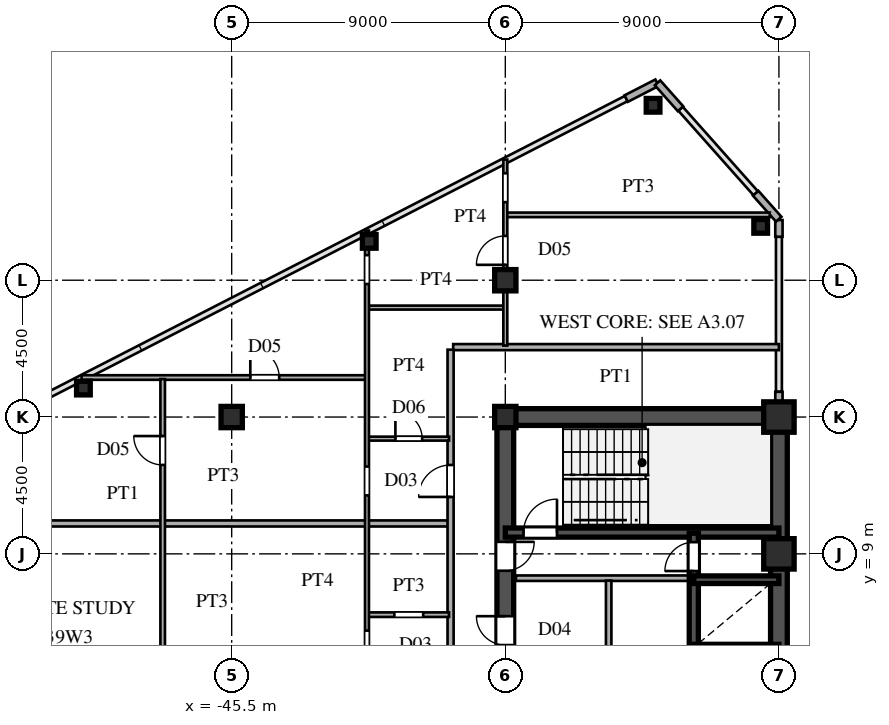
"""IFC4 building model, lengths in metres.
Left out: names, types, materials, properties, quantities, classifications, styles, units other than length and angle.
Written with IfcOpenShell. Run it as: python <this file> out.ifc"""

import sys

from ifc_helpers import new_model, si_unit, direction, frame, frame_2d, origin, origin_2d, place, context, subcontext, project, spatial, rectangle, hollow_rectangle, i_section, extrude, source, transform, mapped, element, fill, save


model = new_model("IFC4")
c1 = context("Model", 3, precision=1e-05, world=origin(), true_north=direction((0.0, 1.0)))
c2 = subcontext(c1, "Body", "Model", "MODEL_VIEW")
j1 = project(units=[si_unit("LENGTHUNIT", "METRE"), si_unit("PLANEANGLEUNIT", "RADIAN")], contexts=[c1])
p1 = place(None, origin())
s1 = spatial("IfcSite", under=j1, at=p1, CompositionType="ELEMENT")
p2 = place(p1, origin())
s2 = spatial("IfcBuilding", under=s1, at=p2, CompositionType="ELEMENT")
p3 = place(p2, frame((0.0, 0.0, 147.6)))
s3 = spatial("IfcBuildingStorey", under=s2, at=p3, CompositionType="ELEMENT", Elevation=147.6)
m1 = source(origin(), c2, "Body", "SweptSolid", [
    extrude(hollow_rectangle(XDim=1.0, YDim=1.0, WallThickness=0.042, at=origin_2d()), origin(), (0.0, 0.0, 1.0), 3.6),
])
for number, where, z_axis, x_axis in (
    (1, (-27.5, 9.0, 0.0), (0.0, 0.0, 1.0), (1.0, 0.0, 0.0)),
    (2, (-27.5, 13.5, 0.0), (0.0, 0.0, 1.0), (1.0, 0.0, 0.0)),
):
    element("IfcColumn", number, at=place(p3, frame(where, z_axis=z_axis, x_axis=x_axis)), inside=s3, PredefinedType="COLUMN", context=c2, shape_type="MappedRepresentation", body=[
        mapped(m1, transform((0.0, 0.0, 0.0), scale=1.0)),
    ])
m2 = source(origin(), c2, "Body", "SweptSolid", [
    extrude(i_section(OverallWidth=0.7, OverallDepth=0.7, WebThickness=0.028, FlangeThickness=0.045, at=origin_2d()), origin(), (0.0, 0.0, 1.0), 3.6),
])
for number, where, z_axis, x_axis in (
    (3, (-36.5, 13.5, 0.0), (0.0, 0.0, 1.0), (1.0, 0.0, 0.0)),
    (4, (-36.5, 18.0, 0.0), (0.0, 0.0, 1.0), (1.0, 0.0, 0.0)),
    (5, (-45.5, 13.5, 0.0), (0.0, 0.0, 1.0), (1.0, 0.0, 0.0)),
):
    element("IfcColumn", number, at=place(p3, frame(where, z_axis=z_axis, x_axis=x_axis)), inside=s3, PredefinedType="COLUMN", context=c2, shape_type="MappedRepresentation", body=[
        mapped(m2, transform((0.0, 0.0, 0.0), scale=1.0)),
    ])
m3 = source(origin(), c2, "Body", "SweptSolid", [
    extrude(hollow_rectangle(XDim=0.45, YDim=0.45, WallThickness=0.018, at=origin_2d()), origin(), (0.0, 0.0, 1.0), 3.6),
])
for number, where, z_axis, x_axis in (
    (6, (-28.1, 19.772, 0.0), (0.0, 0.0, 1.0), (1.0, 0.0, 0.0)),
    (7, (-31.64, 23.754, 0.0), (0.0, 0.0, 1.0), (1.0, 0.0, 0.0)),
    (8, (-40.976, 19.278, 0.0), (0.0, 0.0, 1.0), (1.0, 0.0, 0.0)),
    (9, (-50.377, 14.453, 0.0), (0.0, 0.0, 1.0), (1.0, 0.0, 0.0)),
):
    element("IfcColumn", number, at=place(p3, frame(where, z_axis=z_axis, x_axis=x_axis)), inside=s3, PredefinedType="COLUMN", context=c2, shape_type="MappedRepresentation", body=[
        mapped(m3, transform((0.0, 0.0, 0.0), scale=1.0)),
    ])
p4 = place(p3, frame((-27.5, 13.78, 0.0), z_axis=(0.0, 0.0, 1.0), x_axis=(0.0, 1.0, 0.0)))
e10 = element("IfcWall", 10, at=p4, inside=s3, PredefinedType="SOLIDWALL", context=c2, shape_type="SweptSolid", body=[
    extrude(rectangle(XDim=0.55, YDim=0.24, at=frame_2d((0.275, 0.0))), origin(), (0.0, 0.0, 1.0), 2.88),
])
p5 = place(p3, frame((-27.5, 19.43, 0.0), z_axis=(0.0, 0.0, 1.0), x_axis=(0.0, 1.0, 0.0)))
e11 = element("IfcWall", 11, at=p5, inside=s3, PredefinedType="SOLIDWALL", context=c2, shape_type="SweptSolid", body=[
    extrude(rectangle(XDim=0.55, YDim=0.24, at=frame_2d((0.275, 0.0))), origin(), (0.0, 0.0, 1.0), 3.38),
])
for number, where, z_axis, x_axis in (
    (12, (-27.507, 20.008, 0.0), (0.0, 0.0, 1.0), (-0.664, 0.747, 0.0)),
    (13, (-30.736, 23.64, 0.0), (0.0, 0.0, 1.0), (-0.664, 0.747, 0.0)),
):
    element("IfcWall", number, at=place(p3, frame(where, z_axis=z_axis, x_axis=x_axis)), inside=s3, PredefinedType="SOLIDWALL", context=c2, shape_type="SweptSolid", body=[
        extrude(rectangle(XDim=1.14, YDim=0.24, at=frame_2d((0.57, 0.0))), origin(), (0.0, 0.0, 1.0), 3.38),
    ])
p6 = place(p3, frame((-31.509, 24.495, 0.0), z_axis=(0.0, 0.0, 1.0), x_axis=(-0.889797395748, -0.456355776255, 0.0)))
e14 = element("IfcWall", 14, at=p6, inside=s3, PredefinedType="SOLIDWALL", context=c2, shape_type="SweptSolid", body=[
    extrude(rectangle(XDim=1.14, YDim=0.24, at=frame_2d((0.57, 0.0))), origin(), (0.0, 0.0, 1.0), 3.38),
])
p7 = place(p3, frame((-27.5, 1.3, 0.0), z_axis=(0.0, 0.0, 1.0), x_axis=(0.0, 1.0, 0.0)))
e15 = element("IfcWall", 15, at=p7, inside=s3, PredefinedType="SHEAR", context=c2, shape_type="SweptSolid", body=[
    extrude(rectangle(XDim=12.2, YDim=0.55, at=frame_2d((6.1, 0.0))), origin(), (0.0, 0.0, 1.0), 3.38),
])
p8 = place(p3, frame((-36.5, 13.5, 0.0), z_axis=(0.0, 0.0, 1.0), x_axis=(1.0, 0.0, 0.0)))
e16 = element("IfcWall", 16, at=p8, inside=s3, PredefinedType="SHEAR", context=c2, shape_type="SweptSolid", body=[
    extrude(rectangle(XDim=9.0, YDim=0.55, at=frame_2d((4.5, 0.0))), origin(), (0.0, 0.0, 1.0), 3.38),
])
p9 = place(p3, frame((-36.5, 8.2, 0.0), z_axis=(0.0, 0.0, 1.0), x_axis=(0.0, 1.0, 0.0)))
e17 = element("IfcWall", 17, at=p9, inside=s3, PredefinedType="SHEAR", context=c2, shape_type="SweptSolid", body=[
    extrude(rectangle(XDim=5.45, YDim=0.55, at=frame_2d((2.725, 0.0))), origin(), (0.0, 0.0, 1.0), 3.38),
])
p10 = place(p9, frame((0.245, 0.0, 0.0)))
e18 = element("IfcOpeningElement", 18, at=p10, cuts=e17, PredefinedType="OPENING", context=c2, shape_type="SweptSolid", body=[
    extrude(rectangle(XDim=0.95, YDim=2.15, at=frame_2d((0.475, 1.075))), frame((0.0, 0.285, 0.0), z_axis=(0.0, -1.0, 0.0), x_axis=(1.0, 0.0, 0.0)), (0.0, 0.0, 1.0), 0.57),
])
p11 = place(p3, frame((-36.5, 4.75, 0.0), z_axis=(0.0, 0.0, 1.0), x_axis=(0.0, 1.0, 0.0)))
e19 = element("IfcWall", 19, at=p11, inside=s3, PredefinedType="SHEAR", context=c2, shape_type="SweptSolid", body=[
    extrude(rectangle(XDim=3.45, YDim=0.55, at=frame_2d((1.725, 0.0))), origin(), (0.0, 0.0, 1.0), 3.38),
])
p12 = place(p11, frame((1.25, 0.0, 0.0)))
e20 = element("IfcOpeningElement", 20, at=p12, cuts=e19, PredefinedType="OPENING", context=c2, shape_type="SweptSolid", body=[
    extrude(rectangle(XDim=0.95, YDim=2.15, at=frame_2d((0.475, 1.075))), frame((0.0, 0.285, 0.0), z_axis=(0.0, -1.0, 0.0), x_axis=(1.0, 0.0, 0.0)), (0.0, 0.0, 1.0), 0.57),
])
p13 = place(p3, frame((-36.5, 9.7, 0.0), z_axis=(0.0, 0.0, 1.0), x_axis=(1.0, 0.0, 0.0)))
e21 = element("IfcWall", 21, at=p13, inside=s3, PredefinedType="SHEAR", context=c2, shape_type="SweptSolid", body=[
    extrude(rectangle(XDim=9.0, YDim=0.3, at=frame_2d((4.5, 0.0))), origin(), (0.0, 0.0, 1.0), 3.38),
])
p14 = place(p13, frame((0.6, 0.0, 0.0)))
e22 = element("IfcOpeningElement", 22, at=p14, cuts=e21, PredefinedType="OPENING", context=c2, shape_type="SweptSolid", body=[
    extrude(rectangle(XDim=1.1, YDim=2.2, at=frame_2d((0.55, 1.1))), frame((0.0, 0.16, 0.0), z_axis=(0.0, -1.0, 0.0), x_axis=(1.0, 0.0, 0.0)), (0.0, 0.0, 1.0), 0.32),
])
for number, where, z_axis, x_axis in (
    (23, (-30.3, 5.9, 0.0), (0.0, 0.0, 1.0), (1.0, 0.0, 0.0)),
    (24, (-30.3, 8.15, 0.0), (0.0, 0.0, 1.0), (1.0, 0.0, 0.0)),
):
    element("IfcWall", number, at=place(p3, frame(where, z_axis=z_axis, x_axis=x_axis)), inside=s3, PredefinedType="SHEAR", context=c2, shape_type="SweptSolid", body=[
        extrude(rectangle(XDim=2.8, YDim=0.25, at=frame_2d((1.4, 0.0))), origin(), (0.0, 0.0, 1.0), 3.38),
    ])
p15 = place(p3, frame((-30.3, 5.9, 0.0), z_axis=(0.0, 0.0, 1.0), x_axis=(0.0, 1.0, 0.0)))
e25 = element("IfcWall", 25, at=p15, inside=s3, PredefinedType="SHEAR", context=c2, shape_type="SweptSolid", body=[
    extrude(rectangle(XDim=2.25, YDim=0.3, at=frame_2d((1.125, 0.0))), origin(), (0.0, 0.0, 1.0), 3.38),
])
p16 = place(p3, frame((-30.3, 8.15, 0.0), z_axis=(0.0, 0.0, 1.0), x_axis=(0.0, 1.0, 0.0)))
e26 = element("IfcWall", 26, at=p16, inside=s3, PredefinedType="SHEAR", context=c2, shape_type="SweptSolid", body=[
    extrude(rectangle(XDim=1.53, YDim=0.3, at=frame_2d((0.765, 0.0))), origin(), (0.0, 0.0, 1.0), 3.38),
])
p17 = place(p16, frame((0.285, 0.0, 0.0)))
e27 = element("IfcOpeningElement", 27, at=p17, cuts=e26, PredefinedType="OPENING", context=c2, shape_type="SweptSolid", body=[
    extrude(rectangle(XDim=0.95, YDim=2.15, at=frame_2d((0.475, 1.075))), frame((0.0, 0.16, 0.0), z_axis=(0.0, -1.0, 0.0), x_axis=(1.0, 0.0, 0.0)), (0.0, 0.0, 1.0), 0.32),
])
p18 = place(p3, frame((-36.15, 8.2, 0.0), z_axis=(0.0, 0.0, 1.0), x_axis=(1.0, 0.0, 0.0)))
e28 = element("IfcWall", 28, at=p18, inside=s3, PredefinedType="PARTITIONING", context=c2, shape_type="SweptSolid", body=[
    extrude(rectangle(XDim=5.7, YDim=0.18, at=frame_2d((2.85, 0.0))), origin(), (0.0, 0.0, 1.0), 3.38),
])
p19 = place(p3, frame((-33.1, 1.38, 0.0), z_axis=(0.0, 0.0, 1.0), x_axis=(0.0, 1.0, 0.0)))
e29 = element("IfcWall", 29, at=p19, inside=s3, PredefinedType="PARTITIONING", context=c2, shape_type="SweptSolid", body=[
    extrude(rectangle(XDim=6.74, YDim=0.18, at=frame_2d((3.37, 0.0))), origin(), (0.0, 0.0, 1.0), 3.38),
])
p20 = place(p3, frame((-41.0, 7.0, 0.0), z_axis=(0.0, 0.0, 1.0), x_axis=(1.0, 0.0, 0.0)))
e30 = element("IfcWall", 30, at=p20, inside=s3, PredefinedType="PARTITIONING", context=c2, shape_type="SweptSolid", body=[
    extrude(rectangle(XDim=2.65, YDim=0.15, at=frame_2d((1.325, 0.0))), origin(), (0.0, 0.0, 1.0), 3.38),
])
p21 = place(p20, frame((0.85, 0.0, 0.0)))
e31 = element("IfcOpeningElement", 31, at=p21, cuts=e30, PredefinedType="OPENING", context=c2, shape_type="SweptSolid", body=[
    extrude(rectangle(XDim=0.95, YDim=2.15, at=frame_2d((0.475, 1.075))), frame((0.0, 0.085, 0.0), z_axis=(0.0, -1.0, 0.0), x_axis=(1.0, 0.0, 0.0)), (0.0, 0.0, 1.0), 0.17),
])
p22 = place(p3, frame((-59.767, 10.0, 0.0), z_axis=(0.0, 0.0, 1.0), x_axis=(1.0, 0.0, 0.0)))
e32 = element("IfcWall", 32, at=p22, inside=s3, PredefinedType="PARTITIONING", context=c2, shape_type="SweptSolid", body=[
    extrude(rectangle(XDim=21.387, YDim=0.2, at=frame_2d((10.694, 0.0))), origin(), (0.0, 0.0, 1.0), 3.38),
])
p23 = place(p3, frame((-41.0, 12.79, 0.0), z_axis=(0.0, 0.0, 1.0), x_axis=(1.0, 0.0, 0.0)))
e33 = element("IfcWall", 33, at=p23, inside=s3, PredefinedType="PARTITIONING", context=c2, shape_type="SweptSolid", body=[
    extrude(rectangle(XDim=2.65, YDim=0.13, at=frame_2d((1.325, 0.0))), origin(), (0.0, 0.0, 1.0), 3.38),
])
p24 = place(p23, frame((0.885, 0.0, 0.0)))
e34 = element("IfcOpeningElement", 34, at=p24, cuts=e33, PredefinedType="OPENING", context=c2, shape_type="SweptSolid", body=[
    extrude(rectangle(XDim=0.88, YDim=2.1, at=frame_2d((0.44, 1.05))), frame((0.0, 0.075, 0.0), z_axis=(0.0, -1.0, 0.0), x_axis=(1.0, 0.0, 0.0)), (0.0, 0.0, 1.0), 0.15),
])
p25 = place(p3, frame((-50.438, 14.8, 0.0), z_axis=(0.0, 0.0, 1.0), x_axis=(1.0, 0.0, 0.0)))
e35 = element("IfcWall", 35, at=p25, inside=s3, PredefinedType="PARTITIONING", context=c2, shape_type="SweptSolid", body=[
    extrude(rectangle(XDim=9.338, YDim=0.15, at=frame_2d((4.669, 0.0))), origin(), (0.0, 0.0, 1.0), 3.38),
])
p26 = place(p25, frame((5.551, 0.0, 0.0)))
e36 = element("IfcOpeningElement", 36, at=p26, cuts=e35, PredefinedType="OPENING", context=c2, shape_type="SweptSolid", body=[
    extrude(rectangle(XDim=0.95, YDim=2.15, at=frame_2d((0.475, 1.075))), frame((0.0, 0.085, 0.0), z_axis=(0.0, -1.0, 0.0), x_axis=(1.0, 0.0, 0.0)), (0.0, 0.0, 1.0), 0.17),
])
p27 = place(p3, frame((-38.215, 15.8, 0.0), z_axis=(0.0, 0.0, 1.0), x_axis=(1.0, 0.0, 0.0)))
e37 = element("IfcWall", 37, at=p27, inside=s3, PredefinedType="PARTITIONING", context=c2, shape_type="SweptSolid", body=[
    extrude(rectangle(XDim=10.715, YDim=0.2, at=frame_2d((5.357, 0.0))), origin(), (0.0, 0.0, 1.0), 3.38),
])
p28 = place(p3, frame((-41.0, 17.1, 0.0), z_axis=(0.0, 0.0, 1.0), x_axis=(1.0, 0.0, 0.0)))
e38 = element("IfcWall", 38, at=p28, inside=s3, PredefinedType="PARTITIONING", context=c2, shape_type="SweptSolid", body=[
    extrude(rectangle(XDim=4.45, YDim=0.13, at=frame_2d((2.225, 0.0))), origin(), (0.0, 0.0, 1.0), 3.38),
])
p29 = place(p3, frame((-36.45, 20.15, 0.0), z_axis=(0.0, 0.0, 1.0), x_axis=(1.0, 0.0, 0.0)))
e39 = element("IfcWall", 39, at=p29, inside=s3, PredefinedType="PARTITIONING", context=c2, shape_type="SweptSolid", body=[
    extrude(rectangle(XDim=8.649, YDim=0.15, at=frame_2d((4.325, 0.0))), origin(), (0.0, 0.0, 1.0), 3.38),
])
p30 = place(p3, frame((-47.77, 0.05, 0.0), z_axis=(0.0, 0.0, 1.0), x_axis=(0.0, 1.0, 0.0)))
e40 = element("IfcWall", 40, at=p30, inside=s3, PredefinedType="PARTITIONING", context=c2, shape_type="SweptSolid", body=[
    extrude(rectangle(XDim=14.7, YDim=0.15, at=frame_2d((7.35, 0.0))), origin(), (0.0, 0.0, 1.0), 3.38),
])
p31 = place(p30, frame((1.975, 0.0, 0.0)))
e41 = element("IfcOpeningElement", 41, at=p31, cuts=e40, PredefinedType="OPENING", context=c2, shape_type="SweptSolid", body=[
    extrude(rectangle(XDim=0.95, YDim=2.15, at=frame_2d((0.475, 1.075))), frame((0.0, 0.085, 0.0), z_axis=(0.0, -1.0, 0.0), x_axis=(1.0, 0.0, 0.0)), (0.0, 0.0, 1.0), 0.17),
])
p32 = place(p30, frame((11.875, 0.0, 0.0)))
e42 = element("IfcOpeningElement", 42, at=p32, cuts=e40, PredefinedType="OPENING", context=c2, shape_type="SweptSolid", body=[
    extrude(rectangle(XDim=0.95, YDim=2.15, at=frame_2d((0.475, 1.075))), frame((0.0, 0.085, 0.0), z_axis=(0.0, -1.0, 0.0), x_axis=(1.0, 0.0, 0.0)), (0.0, 0.0, 1.0), 0.17),
])
p33 = place(p3, frame((-41.05, -3.398, 0.0), z_axis=(0.0, 0.0, 1.0), x_axis=(0.0, 1.0, 0.0)))
e43 = element("IfcWall", 43, at=p33, inside=s3, PredefinedType="PARTITIONING", context=c2, shape_type="SweptSolid", body=[
    extrude(rectangle(XDim=23.032, YDim=0.13, at=frame_2d((11.516, 0.0))), origin(), (0.0, 0.0, 1.0), 2.99),
])
p34 = place(p33, frame((6.772, 0.0, 0.0)))
e44 = element("IfcOpeningElement", 44, at=p34, cuts=e43, PredefinedType="OPENING", context=c2, shape_type="SweptSolid", body=[
    extrude(rectangle(XDim=0.95, YDim=2.15, at=frame_2d((0.475, 1.075))), frame((0.0, 0.075, 0.0), z_axis=(0.0, -1.0, 0.0), x_axis=(1.0, 0.0, 0.0)), (0.0, 0.0, 1.0), 0.15),
])
p35 = place(p33, frame((8.924, 0.0, 0.0)))
e45 = element("IfcOpeningElement", 45, at=p35, cuts=e43, PredefinedType="OPENING", context=c2, shape_type="SweptSolid", body=[
    extrude(rectangle(XDim=0.95, YDim=2.15, at=frame_2d((0.475, 1.075))), frame((0.0, 0.075, 0.0), z_axis=(0.0, -1.0, 0.0), x_axis=(1.0, 0.0, 0.0)), (0.0, 0.0, 1.0), 0.15),
])
p36 = place(p33, frame((14.321, 0.0, 0.0)))
e46 = element("IfcOpeningElement", 46, at=p36, cuts=e43, PredefinedType="OPENING", context=c2, shape_type="SweptSolid", body=[
    extrude(rectangle(XDim=0.95, YDim=2.15, at=frame_2d((0.475, 1.075))), frame((0.0, 0.075, 0.0), z_axis=(0.0, -1.0, 0.0), x_axis=(1.0, 0.0, 0.0)), (0.0, 0.0, 1.0), 0.15),
])
p37 = place(p33, frame((21.273, 0.0, 0.0)))
e47 = element("IfcOpeningElement", 47, at=p37, cuts=e43, PredefinedType="OPENING", context=c2, shape_type="SweptSolid", body=[
    extrude(rectangle(XDim=0.95, YDim=2.15, at=frame_2d((0.475, 1.075))), frame((0.0, 0.075, 0.0), z_axis=(0.0, -1.0, 0.0), x_axis=(1.0, 0.0, 0.0)), (0.0, 0.0, 1.0), 0.15),
])
p38 = place(p3, frame((-38.3, -15.715, 0.0), z_axis=(0.0, 0.0, 1.0), x_axis=(0.0, 1.0, 0.0)))
e48 = element("IfcWall", 48, at=p38, inside=s3, PredefinedType="PARTITIONING", context=c2, shape_type="SweptSolid", body=[
    extrude(rectangle(XDim=31.43, YDim=0.2, at=frame_2d((15.715, 0.0))), origin(), (0.0, 0.0, 1.0), 3.38),
])
p39 = place(p38, frame((2.39, 0.0, 0.0)))
e49 = element("IfcOpeningElement", 49, at=p39, cuts=e48, PredefinedType="OPENING", context=c2, shape_type="SweptSolid", body=[
    extrude(rectangle(XDim=1.05, YDim=2.25, at=frame_2d((0.525, 1.125))), frame((0.0, 0.11, 0.0), z_axis=(0.0, -1.0, 0.0), x_axis=(1.0, 0.0, 0.0)), (0.0, 0.0, 1.0), 0.22),
])
p40 = place(p38, frame((9.268, 0.0, 0.0)))
e50 = element("IfcOpeningElement", 50, at=p40, cuts=e48, PredefinedType="OPENING", context=c2, shape_type="SweptSolid", body=[
    extrude(rectangle(XDim=1.05, YDim=2.25, at=frame_2d((0.525, 1.125))), frame((0.0, 0.11, 0.0), z_axis=(0.0, -1.0, 0.0), x_axis=(1.0, 0.0, 0.0)), (0.0, 0.0, 1.0), 0.22),
])
p41 = place(p38, frame((20.04, 0.0, 0.0)))
e51 = element("IfcOpeningElement", 51, at=p41, cuts=e48, PredefinedType="OPENING", context=c2, shape_type="SweptSolid", body=[
    extrude(rectangle(XDim=1.05, YDim=2.25, at=frame_2d((0.525, 1.125))), frame((0.0, 0.11, 0.0), z_axis=(0.0, -1.0, 0.0), x_axis=(1.0, 0.0, 0.0)), (0.0, 0.0, 1.0), 0.22),
])
p42 = place(p38, frame((26.587, 0.0, 0.0)))
e52 = element("IfcOpeningElement", 52, at=p42, cuts=e48, PredefinedType="OPENING", context=c2, shape_type="SweptSolid", body=[
    extrude(rectangle(XDim=1.05, YDim=2.25, at=frame_2d((0.525, 1.125))), frame((0.0, 0.11, 0.0), z_axis=(0.0, -1.0, 0.0), x_axis=(1.0, 0.0, 0.0)), (0.0, 0.0, 1.0), 0.22),
])
p43 = place(p3, frame((-36.5, 15.85, 0.0), z_axis=(0.0, 0.0, 1.0), x_axis=(0.0, 1.0, 0.0)))
e53 = element("IfcWall", 53, at=p43, inside=s3, PredefinedType="PARTITIONING", context=c2, shape_type="SweptSolid", body=[
    extrude(rectangle(XDim=6.119, YDim=0.13, at=frame_2d((3.06, 0.0))), origin(), (0.0, 0.0, 1.0), 2.78),
])
p44 = place(p43, frame((2.656, 0.0, 0.0)))
e54 = element("IfcOpeningElement", 54, at=p44, cuts=e53, PredefinedType="OPENING", context=c2, shape_type="SweptSolid", body=[
    extrude(rectangle(XDim=0.95, YDim=2.15, at=frame_2d((0.475, 1.075))), frame((0.0, 0.075, 0.0), z_axis=(0.0, -1.0, 0.0), x_axis=(1.0, 0.0, 0.0)), (0.0, 0.0, 1.0), 0.15),
])
p45 = place(p43, frame((4.717, 0.0, 0.0)))
e55 = element("IfcOpeningElement", 55, at=p45, cuts=e53, PredefinedType="OPENING", context=c2, shape_type="SweptSolid", body=[
    extrude(rectangle(XDim=0.95, YDim=2.15, at=frame_2d((0.475, 1.075))), frame((0.0, 0.075, 0.0), z_axis=(0.0, -1.0, 0.0), x_axis=(1.0, 0.0, 0.0)), (0.0, 0.0, 1.0), 0.15),
])
m4 = source(origin(), c2, "Body", "SweptSolid", [
    extrude(rectangle(XDim=0.95, YDim=2.15, at=frame_2d((0.475, 1.075))), frame((0.0, 0.025, 0.0), z_axis=(0.0, -1.0, 0.0), x_axis=(1.0, 0.0, 0.0)), (0.0, 0.0, 1.0), 0.05),
])
p46 = place(p10, frame((0.95, 0.0, 0.0), z_axis=(0.0, 0.0, 1.0), x_axis=(-1.0, 0.0, 0.0)))
e56 = element("IfcDoor", 56, at=p46, inside=s3, OperationType="SINGLE_SWING_RIGHT", PredefinedType="DOOR", context=c2, shape_type="MappedRepresentation", body=[
    mapped(m4, transform((0.0, 0.0, 0.0), scale=1.0)),
])
fill(e18, e56)
p47 = place(p12, origin())
e57 = element("IfcDoor", 57, at=p47, inside=s3, OperationType="SINGLE_SWING_RIGHT", PredefinedType="DOOR", context=c2, shape_type="MappedRepresentation", body=[
    mapped(m4, transform((0.0, 0.0, 0.0), scale=1.0)),
])
fill(e20, e57)
m5 = source(origin(), c2, "Body", "SweptSolid", [
    extrude(rectangle(XDim=1.1, YDim=2.2, at=frame_2d((0.55, 1.1))), frame((0.0, 0.025, 0.0), z_axis=(0.0, -1.0, 0.0), x_axis=(1.0, 0.0, 0.0)), (0.0, 0.0, 1.0), 0.05),
])
p48 = place(p14, origin())
e58 = element("IfcDoor", 58, at=p48, inside=s3, OperationType="SINGLE_SWING_RIGHT", PredefinedType="DOOR", context=c2, shape_type="MappedRepresentation", body=[
    mapped(m5, transform((0.0, 0.0, 0.0), scale=1.0)),
])
fill(e22, e58)
p49 = place(p17, origin())
e59 = element("IfcDoor", 59, at=p49, inside=s3, OperationType="SINGLE_SWING_LEFT", PredefinedType="DOOR", context=c2, shape_type="MappedRepresentation", body=[
    mapped(m4, transform((0.0, 0.0, 0.0), scale=1.0)),
])
fill(e27, e59)
m6 = source(origin(), c2, "Body", "SweptSolid", [
    extrude(rectangle(XDim=0.88, YDim=2.1, at=frame_2d((0.44, 1.05))), frame((0.0, 0.025, 0.0), z_axis=(0.0, -1.0, 0.0), x_axis=(1.0, 0.0, 0.0)), (0.0, 0.0, 1.0), 0.05),
])
p50 = place(p24, origin())
e60 = element("IfcDoor", 60, at=p50, inside=s3, OperationType="SINGLE_SWING_LEFT", PredefinedType="DOOR", context=c2, shape_type="MappedRepresentation", body=[
    mapped(m6, transform((0.0, 0.0, 0.0), scale=1.0)),
])
fill(e34, e60)
m7 = source(origin(), c2, "Body", "SweptSolid", [
    extrude(rectangle(XDim=0.95, YDim=2.15, at=frame_2d((0.475, 1.075))), frame((0.0, 0.025, 0.0), z_axis=(0.0, -1.0, 0.0), x_axis=(1.0, 0.0, 0.0)), (0.0, 0.0, 1.0), 0.05),
])
p51 = place(p26, origin())
e61 = element("IfcDoor", 61, at=p51, inside=s3, OperationType="SINGLE_SWING_LEFT", PredefinedType="DOOR", context=c2, shape_type="MappedRepresentation", body=[
    mapped(m7, transform((0.0, 0.0, 0.0), scale=1.0)),
])
fill(e36, e61)
p52 = place(p32, origin())
e62 = element("IfcDoor", 62, at=p52, inside=s3, OperationType="SINGLE_SWING_RIGHT", PredefinedType="DOOR", context=c2, shape_type="MappedRepresentation", body=[
    mapped(m7, transform((0.0, 0.0, 0.0), scale=1.0)),
])
fill(e42, e62)
m8 = source(origin(), c2, "Body", "SweptSolid", [
    extrude(rectangle(XDim=1.05, YDim=2.25, at=frame_2d((0.525, 1.125))), frame((0.0, 0.025, 0.0), z_axis=(0.0, -1.0, 0.0), x_axis=(1.0, 0.0, 0.0)), (0.0, 0.0, 1.0), 0.05),
])
p53 = place(p42, origin())
e63 = element("IfcDoor", 63, at=p53, inside=s3, OperationType="SINGLE_SWING_LEFT", PredefinedType="DOOR", context=c2, shape_type="MappedRepresentation", body=[
    mapped(m8, transform((0.0, 0.0, 0.0), scale=1.0)),
])
fill(e52, e63)
p54 = place(p44, origin())
e64 = element("IfcDoor", 64, at=p54, inside=s3, OperationType="SINGLE_SWING_LEFT", PredefinedType="DOOR", context=c2, shape_type="MappedRepresentation", body=[
    mapped(m7, transform((0.0, 0.0, 0.0), scale=1.0)),
])
fill(e54, e64)
save(model, sys.argv[1])
